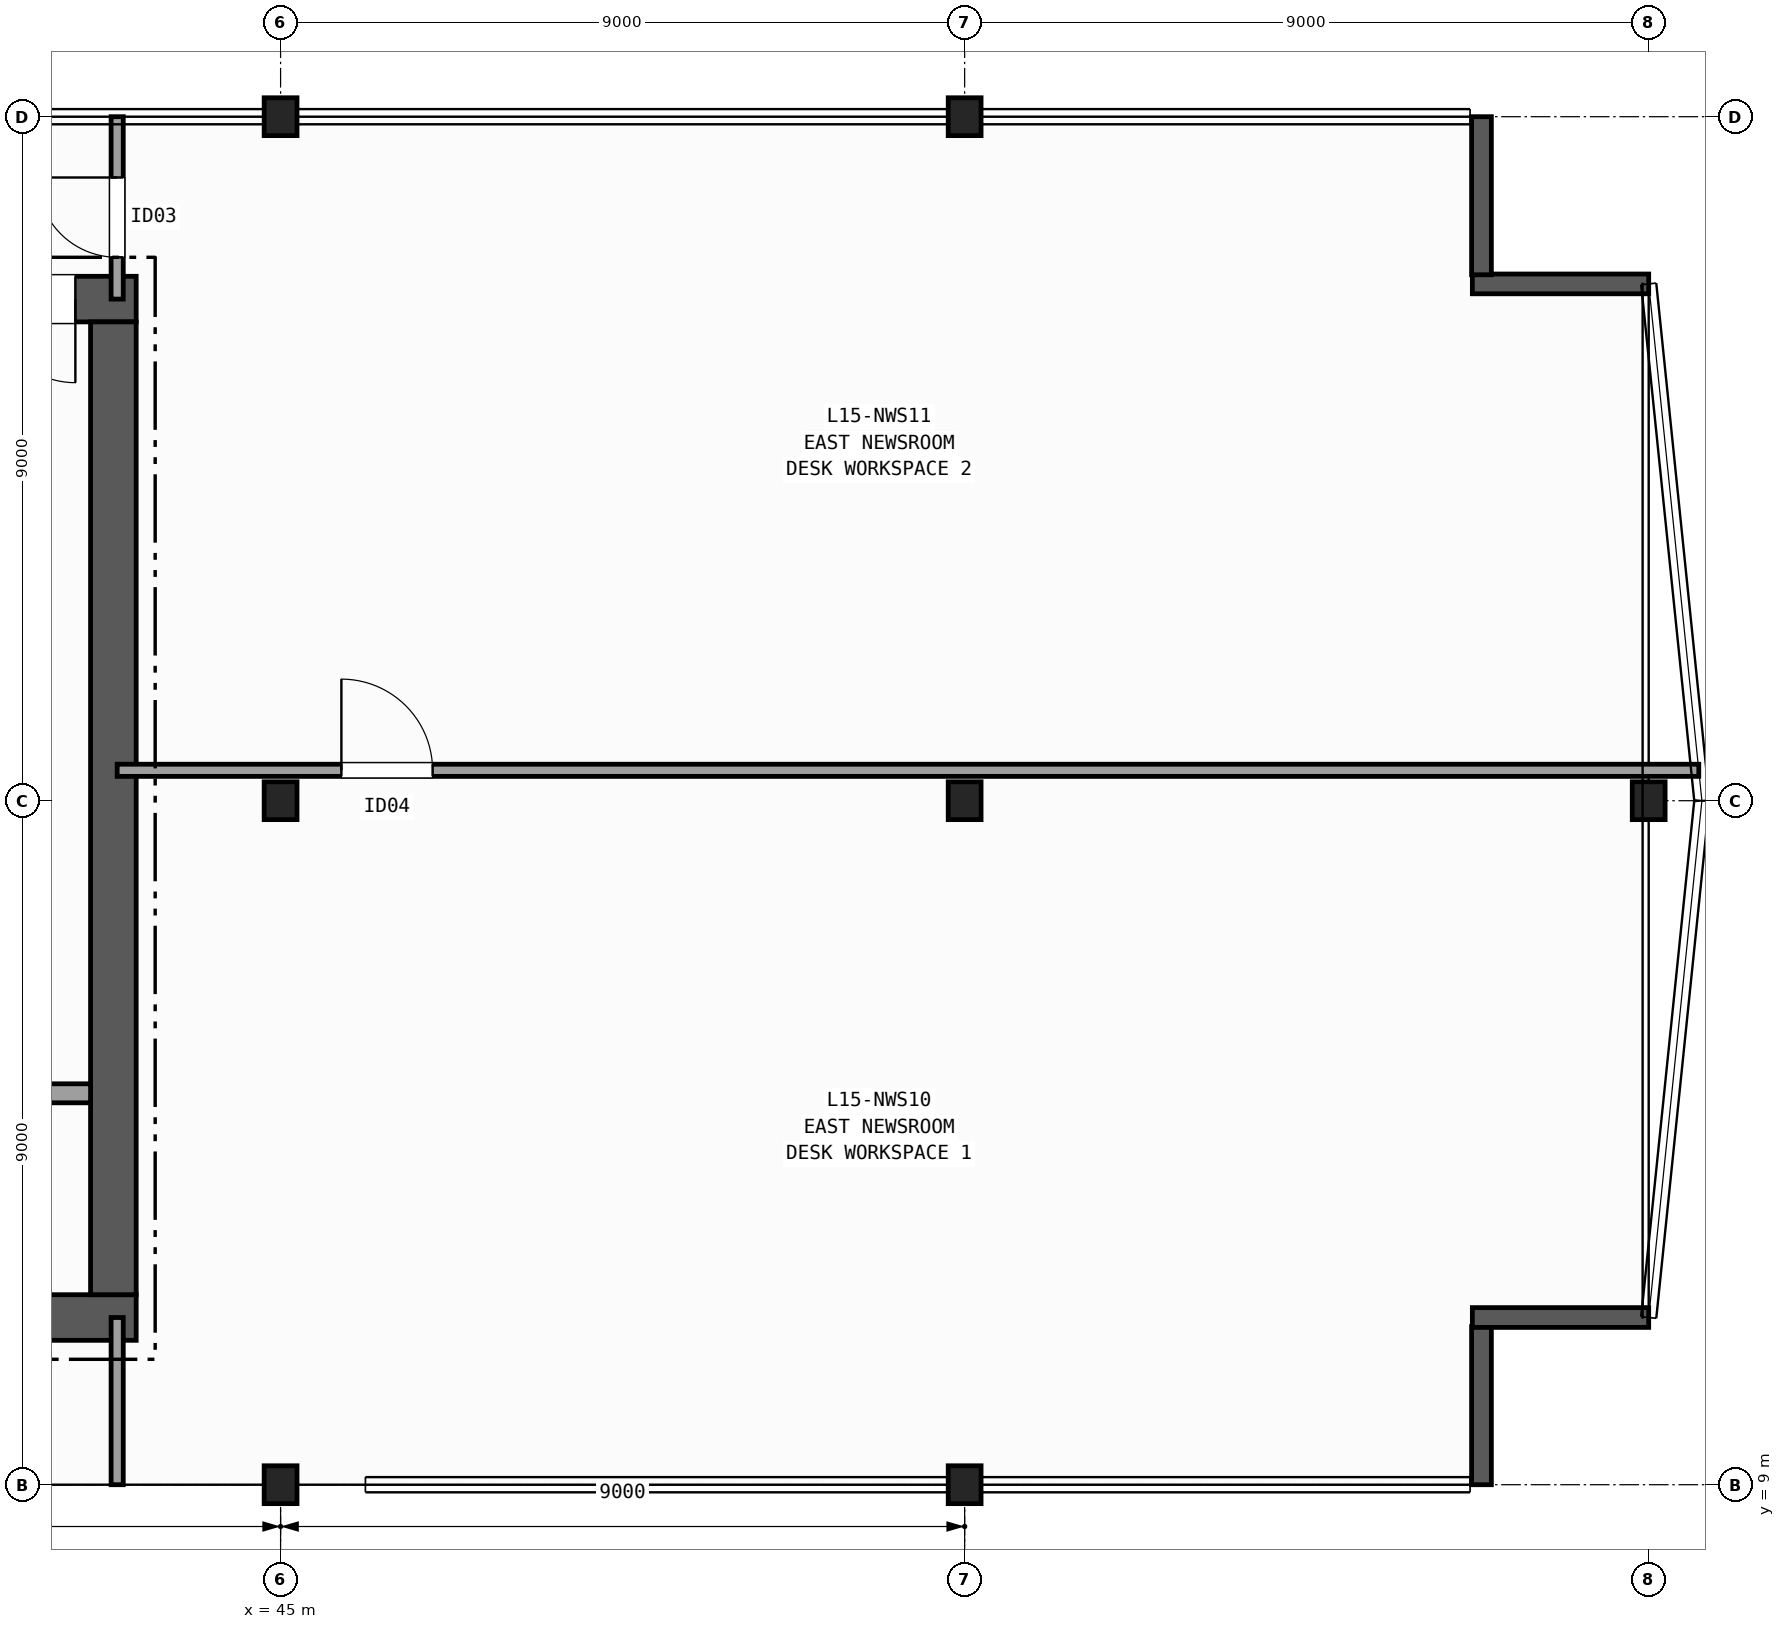
"""IFC4 building model, lengths in metres.
Left out: names, types, materials, properties, quantities, classifications, styles, units other than length and angle.
Written with IfcOpenShell. Run it as: python <this file> out.ifc"""

import sys

from ifc_helpers import new_model, si_unit, direction, frame, frame_2d, origin, origin_2d, place, context, subcontext, project, spatial, rectangle, i_section, extrude, element, fill, save


model = new_model("IFC4")
c1 = context("Model", 3, precision=1e-05, world=origin(), true_north=direction((0.0, 1.0)))
c2 = subcontext(c1, "Body", "Model", "MODEL_VIEW")
j1 = project(units=[si_unit("LENGTHUNIT", "METRE"), si_unit("PLANEANGLEUNIT", "RADIAN")], contexts=[c1])
p1 = place(None, origin())
s1 = spatial("IfcSite", under=j1, at=p1, CompositionType="ELEMENT")
p2 = place(p1, origin())
s2 = spatial("IfcBuilding", under=s1, at=p2, CompositionType="ELEMENT")
p3 = place(p2, frame((0.0, 0.0, 65.6)))
s3 = spatial("IfcBuildingStorey", under=s2, at=p3, CompositionType="ELEMENT", Elevation=65.6)
for number, where, z_axis, x_axis in (
    (1, (45.0, 9.0, 0.0), (0.0, 0.0, 1.0), (1.0, 0.0, 0.0)),
    (2, (45.0, 18.0, 0.0), (0.0, 0.0, 1.0), (1.0, 0.0, 0.0)),
    (3, (45.0, 27.0, 0.0), (0.0, 0.0, 1.0), (1.0, 0.0, 0.0)),
    (4, (54.0, 9.0, 0.0), (0.0, 0.0, 1.0), (1.0, 0.0, 0.0)),
    (5, (54.0, 18.0, 0.0), (0.0, 0.0, 1.0), (1.0, 0.0, 0.0)),
    (6, (54.0, 27.0, 0.0), (0.0, 0.0, 1.0), (1.0, 0.0, 0.0)),
    (7, (63.0, 18.0, 0.0), (0.0, 0.0, 1.0), (1.0, 0.0, 0.0)),
):
    element("IfcColumn", number, at=place(p3, frame(where, z_axis=z_axis, x_axis=x_axis)), inside=s3, PredefinedType="COLUMN", context=c2, shape_type="SweptSolid", body=[
        extrude(i_section(OverallWidth=0.432, OverallDepth=0.498, WebThickness=0.056, FlangeThickness=0.089, FilletRadius=0.015, at=origin_2d()), origin(), (0.0, 0.0, 1.0), 3.7),
    ])
p4 = place(p3, frame((60.8, 9.0, 0.0), z_axis=(0.0, 0.0, 1.0), x_axis=(0.0, 1.0, 0.0)))
e8 = element("IfcWall", 8, at=p4, inside=s3, PredefinedType="SOLIDWALL", context=c2, shape_type="SweptSolid", body=[
    extrude(rectangle(XDim=2.08, YDim=0.26, at=frame_2d((1.04, 0.0))), origin(), (0.0, 0.0, 1.0), 3.42),
])
for number, where, z_axis, x_axis in (
    (9, (60.68, 11.2, 0.0), (0.0, 0.0, 1.0), (1.0, 0.0, 0.0)),
    (10, (63.0, 24.8, 0.0), (0.0, 0.0, 1.0), (-1.0, 0.0, 0.0)),
):
    element("IfcWall", number, at=place(p3, frame(where, z_axis=z_axis, x_axis=x_axis)), inside=s3, PredefinedType="SOLIDWALL", context=c2, shape_type="SweptSolid", body=[
        extrude(rectangle(XDim=2.32, YDim=0.26, at=frame_2d((1.16, 0.0))), origin(), (0.0, 0.0, 1.0), 3.42),
    ])
p5 = place(p3, frame((60.8, 24.92, 0.0), z_axis=(0.0, 0.0, 1.0), x_axis=(0.0, 1.0, 0.0)))
e11 = element("IfcWall", 11, at=p5, inside=s3, PredefinedType="SOLIDWALL", context=c2, shape_type="SweptSolid", body=[
    extrude(rectangle(XDim=2.08, YDim=0.26, at=frame_2d((1.04, 0.0))), origin(), (0.0, 0.0, 1.0), 3.42),
])
p6 = place(p3, frame((29.1, 11.2, 0.0), z_axis=(0.0, 0.0, 1.0), x_axis=(1.0, 0.0, 0.0)))
e12 = element("IfcWall", 12, at=p6, inside=s3, PredefinedType="SHEAR", context=c2, shape_type="SweptSolid", body=[
    extrude(rectangle(XDim=14.0, YDim=0.6, at=frame_2d((7.0, 0.0))), origin(), (0.0, 0.0, 1.0), 3.42),
])
p7 = place(p3, frame((43.1, 24.6, 0.0), z_axis=(0.0, 0.0, 1.0), x_axis=(-1.0, 0.0, 0.0)))
e13 = element("IfcWall", 13, at=p7, inside=s3, PredefinedType="SHEAR", context=c2, shape_type="SweptSolid", body=[
    extrude(rectangle(XDim=14.0, YDim=0.6, at=frame_2d((7.0, 0.0))), origin(), (0.0, 0.0, 1.0), 3.42),
])
p8 = place(p7, frame((0.8, 0.0, 0.0)))
e14 = element("IfcOpeningElement", 14, at=p8, cuts=e13, PredefinedType="OPENING", context=c2, shape_type="SweptSolid", body=[
    extrude(rectangle(XDim=1.1, YDim=2.15, at=frame_2d((0.55, 1.075))), frame((0.0, 0.31, 0.0), z_axis=(0.0, -1.0, 0.0), x_axis=(1.0, 0.0, 0.0)), (0.0, 0.0, 1.0), 0.62),
])
p9 = place(p7, frame((2.75, 0.0, 0.0)))
e15 = element("IfcOpeningElement", 15, at=p9, cuts=e13, PredefinedType="OPENING", context=c2, shape_type="SweptSolid", body=[
    extrude(rectangle(XDim=0.9, YDim=2.1, at=frame_2d((0.45, 1.05))), frame((0.0, 0.31, 0.0), z_axis=(0.0, -1.0, 0.0), x_axis=(1.0, 0.0, 0.0)), (0.0, 0.0, 1.0), 0.62),
])
p10 = place(p7, frame((4.65, 0.0, 0.0)))
e16 = element("IfcOpeningElement", 16, at=p10, cuts=e13, PredefinedType="OPENING", context=c2, shape_type="SweptSolid", body=[
    extrude(rectangle(XDim=0.9, YDim=2.1, at=frame_2d((0.45, 1.05))), frame((0.0, 0.31, 0.0), z_axis=(0.0, -1.0, 0.0), x_axis=(1.0, 0.0, 0.0)), (0.0, 0.0, 1.0), 0.62),
])
p11 = place(p3, frame((42.8, 11.5, 0.0), z_axis=(0.0, 0.0, 1.0), x_axis=(0.0, 1.0, 0.0)))
e17 = element("IfcWall", 17, at=p11, inside=s3, PredefinedType="SHEAR", context=c2, shape_type="SweptSolid", body=[
    extrude(rectangle(XDim=12.8, YDim=0.6, at=frame_2d((6.4, 0.0))), origin(), (0.0, 0.0, 1.0), 3.42),
])
p12 = place(p3, frame((33.07, 14.15, 0.0), z_axis=(0.0, 0.0, 1.0), x_axis=(1.0, 0.0, 0.0)))
e18 = element("IfcWall", 18, at=p12, inside=s3, PredefinedType="PARTITIONING", context=c2, shape_type="SweptSolid", body=[
    extrude(rectangle(XDim=9.43, YDim=0.25, at=frame_2d((4.715, 0.0))), origin(), (0.0, 0.0, 1.0), 3.42),
])
p13 = place(p12, frame((0.755, 0.0, 0.0)))
e19 = element("IfcOpeningElement", 19, at=p13, cuts=e18, PredefinedType="OPENING", context=c2, shape_type="SweptSolid", body=[
    extrude(rectangle(XDim=1.15, YDim=2.15, at=frame_2d((0.575, 1.075))), frame((0.0, 0.135, 0.0), z_axis=(0.0, -1.0, 0.0), x_axis=(1.0, 0.0, 0.0)), (0.0, 0.0, 1.0), 0.27),
])
p14 = place(p12, frame((3.355, 0.0, 0.0)))
e20 = element("IfcOpeningElement", 20, at=p14, cuts=e18, PredefinedType="OPENING", context=c2, shape_type="SweptSolid", body=[
    extrude(rectangle(XDim=1.15, YDim=2.15, at=frame_2d((0.575, 1.075))), frame((0.0, 0.135, 0.0), z_axis=(0.0, -1.0, 0.0), x_axis=(1.0, 0.0, 0.0)), (0.0, 0.0, 1.0), 0.27),
])
p15 = place(p3, frame((42.85, 9.0, 0.0), z_axis=(0.0, 0.0, 1.0), x_axis=(0.0, 1.0, 0.0)))
e21 = element("IfcWall", 21, at=p15, inside=s3, PredefinedType="PARTITIONING", context=c2, shape_type="SweptSolid", body=[
    extrude(rectangle(XDim=2.2, YDim=0.16, at=frame_2d((1.1, 0.0))), origin(), (0.0, 0.0, 1.0), 2.627),
])
p16 = place(p3, frame((42.85, 24.6, 0.0), z_axis=(0.0, 0.0, 1.0), x_axis=(0.0, 1.0, 0.0)))
e22 = element("IfcWall", 22, at=p16, inside=s3, PredefinedType="PARTITIONING", context=c2, shape_type="SweptSolid", body=[
    extrude(rectangle(XDim=2.4, YDim=0.16, at=frame_2d((1.2, 0.0))), origin(), (0.0, 0.0, 1.0), 2.627),
])
p17 = place(p16, frame((0.55, 0.0, 0.0)))
e23 = element("IfcOpeningElement", 23, at=p17, cuts=e22, PredefinedType="OPENING", context=c2, shape_type="SweptSolid", body=[
    extrude(rectangle(XDim=1.05, YDim=2.15, at=frame_2d((0.525, 1.075))), frame((0.0, 0.09, 0.0), z_axis=(0.0, -1.0, 0.0), x_axis=(1.0, 0.0, 0.0)), (0.0, 0.0, 1.0), 0.18),
])
p18 = place(p3, frame((42.85, 18.4, 0.0), z_axis=(0.0, 0.0, 1.0), x_axis=(1.0, 0.0, 0.0)))
e24 = element("IfcWall", 24, at=p18, inside=s3, PredefinedType="PARTITIONING", context=c2, shape_type="SweptSolid", body=[
    extrude(rectangle(XDim=20.809, YDim=0.16, at=frame_2d((10.404, 0.0))), origin(), (0.0, 0.0, 1.0), 3.42),
])
p19 = place(p18, frame((2.95, 0.0, 0.0)))
e25 = element("IfcOpeningElement", 25, at=p19, cuts=e24, PredefinedType="OPENING", context=c2, shape_type="SweptSolid", body=[
    extrude(rectangle(XDim=1.2, YDim=2.15, at=frame_2d((0.6, 1.075))), frame((0.0, 0.09, 0.0), z_axis=(0.0, -1.0, 0.0), x_axis=(1.0, 0.0, 0.0)), (0.0, 0.0, 1.0), 0.18),
])
p20 = place(p8, origin())
e26 = element("IfcDoor", 26, at=p20, inside=s3, OperationType="SINGLE_SWING_LEFT", PredefinedType="DOOR", context=c2, shape_type="SweptSolid", body=[
    extrude(rectangle(XDim=1.1, YDim=2.15, at=frame_2d((0.55, 1.075))), frame((0.0, 0.025, 0.0), z_axis=(0.0, -1.0, 0.0), x_axis=(1.0, 0.0, 0.0)), (0.0, 0.0, 1.0), 0.05),
])
fill(e14, e26)
p21 = place(p17, origin())
e27 = element("IfcDoor", 27, at=p21, inside=s3, OperationType="SINGLE_SWING_RIGHT", PredefinedType="DOOR", context=c2, shape_type="SweptSolid", body=[
    extrude(rectangle(XDim=1.05, YDim=2.15, at=frame_2d((0.525, 1.075))), frame((0.0, 0.025, 0.0), z_axis=(0.0, -1.0, 0.0), x_axis=(1.0, 0.0, 0.0)), (0.0, 0.0, 1.0), 0.05),
])
fill(e23, e27)
p22 = place(p19, origin())
e28 = element("IfcDoor", 28, at=p22, inside=s3, OperationType="SINGLE_SWING_LEFT", PredefinedType="DOOR", context=c2, shape_type="SweptSolid", body=[
    extrude(rectangle(XDim=1.2, YDim=2.15, at=frame_2d((0.6, 1.075))), frame((0.0, 0.025, 0.0), z_axis=(0.0, -1.0, 0.0), x_axis=(1.0, 0.0, 0.0)), (0.0, 0.0, 1.0), 0.05),
])
fill(e25, e28)
save(model, sys.argv[1])
